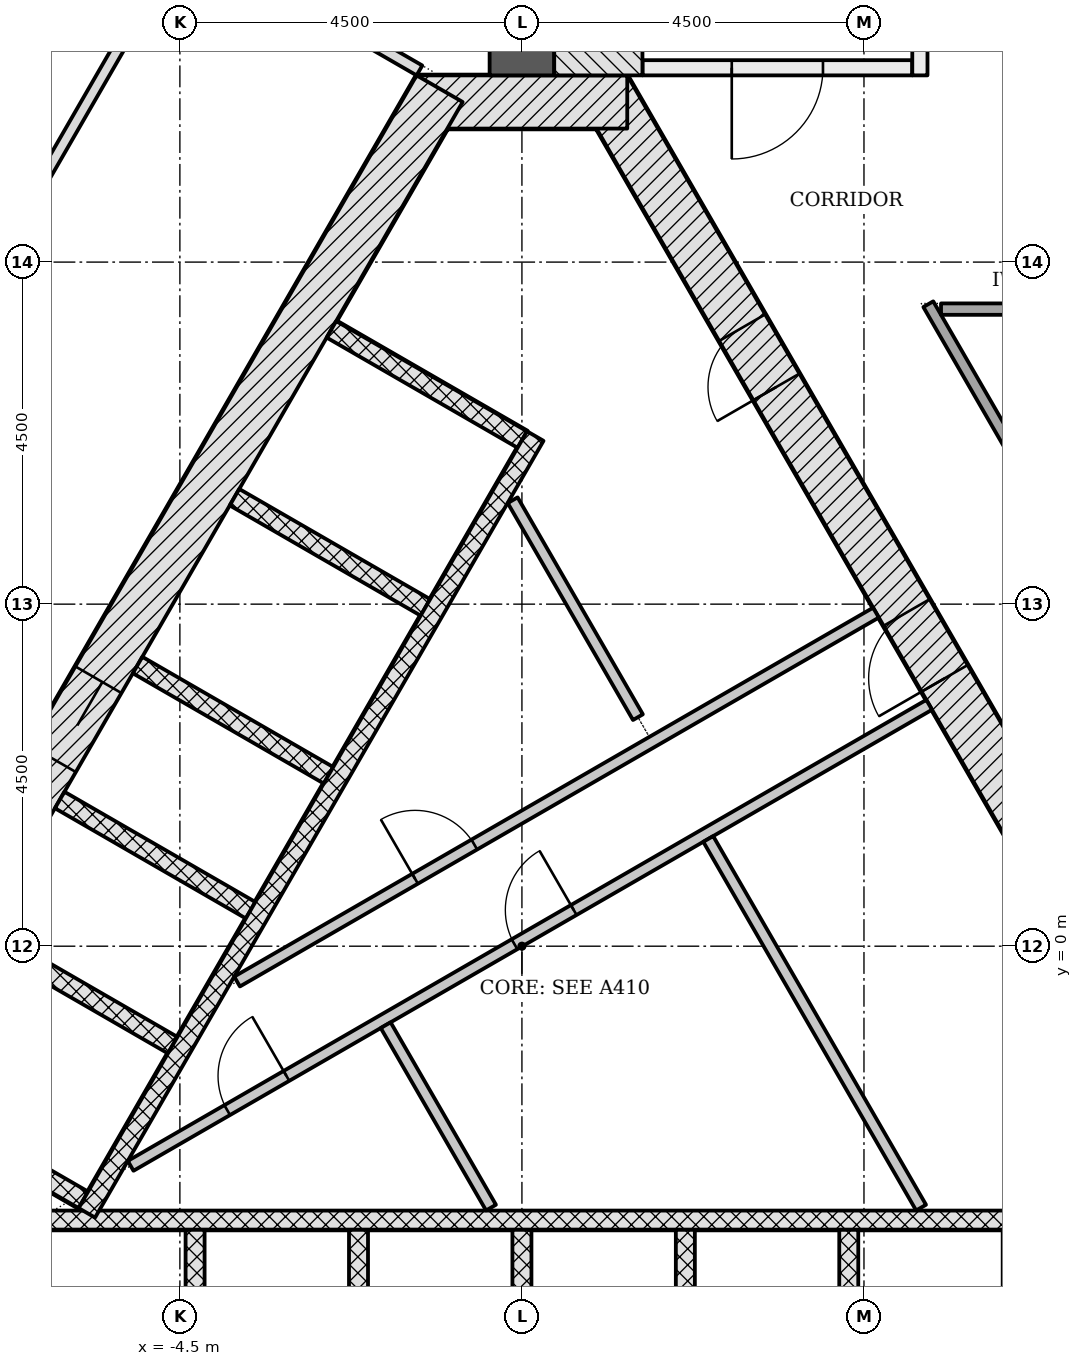
"""IFC4 building model, lengths in metres.
Left out: names, types, materials, properties, quantities, classifications, styles, units other than length and angle.
Written with IfcOpenShell. Run it as: python <this file> out.ifc"""

import sys

from ifc_helpers import new_model, si_unit, direction, frame, frame_2d, origin, place, context, subcontext, project, spatial, rectangle, extrude, element, fill, save


model = new_model("IFC4")
c1 = context("Model", 3, precision=1e-05, world=origin(), true_north=direction((0.0, 1.0)))
c2 = subcontext(c1, "Body", "Model", "MODEL_VIEW")
j1 = project(units=[si_unit("LENGTHUNIT", "METRE"), si_unit("PLANEANGLEUNIT", "RADIAN")], contexts=[c1])
p1 = place(None, origin())
s1 = spatial("IfcSite", under=j1, at=p1, CompositionType="ELEMENT")
p2 = place(p1, origin())
s2 = spatial("IfcBuilding", under=s1, at=p2, CompositionType="ELEMENT")
p3 = place(p2, frame((0.0, 0.0, 72.6)))
s3 = spatial("IfcBuildingStorey", under=s2, at=p3, CompositionType="ELEMENT", Elevation=72.6)
p4 = place(p3, frame((10.311, -4.703, -0.2), z_axis=(0.0, 0.0, 1.0), x_axis=(-0.500001446645, 0.866024568562, 0.0)))
e1 = element("IfcWall", 1, at=p4, inside=s3, PredefinedType="SHEAR", context=c2, shape_type="SweptSolid", body=[
    extrude(rectangle(XDim=18.458, YDim=0.7, at=frame_2d((9.229, 0.0))), origin(), (0.0, 0.0, 1.0), 3.6),
])
p5 = place(p4, frame((9.5, 0.0, 0.2)))
e2 = element("IfcOpeningElement", 2, at=p5, cuts=e1, PredefinedType="OPENING", context=c2, shape_type="SweptSolid", body=[
    extrude(rectangle(XDim=1.0, YDim=2.1, at=frame_2d((0.5, 1.05))), frame((0.0, 0.36, 0.0), z_axis=(0.0, -1.0, 0.0), x_axis=(1.0, 0.0, 0.0)), (0.0, 0.0, 1.0), 0.72),
])
p6 = place(p4, frame((4.402, 0.0, 0.2)))
e3 = element("IfcOpeningElement", 3, at=p6, cuts=e1, PredefinedType="OPENING", context=c2, shape_type="SweptSolid", body=[
    extrude(rectangle(XDim=0.9, YDim=2.1, at=frame_2d((0.45, 1.05))), frame((0.0, 0.36, 0.0), z_axis=(0.0, -1.0, 0.0), x_axis=(1.0, 0.0, 0.0)), (0.0, 0.0, 1.0), 0.72),
])
p7 = place(p4, frame((13.927, 0.0, 0.2)))
e4 = element("IfcOpeningElement", 4, at=p7, cuts=e1, PredefinedType="OPENING", context=c2, shape_type="SweptSolid", body=[
    extrude(rectangle(XDim=0.9, YDim=2.1, at=frame_2d((0.45, 1.05))), frame((0.0, 0.36, 0.0), z_axis=(0.0, -1.0, 0.0), x_axis=(1.0, 0.0, 0.0)), (0.0, 0.0, 1.0), 0.72),
])
p8 = place(p3, frame((1.386, 11.106, -0.2), z_axis=(0.0, 0.0, 1.0), x_axis=(-1.0, 0.0, 0.0)))
e5 = element("IfcWall", 5, at=p8, inside=s3, PredefinedType="SHEAR", context=c2, shape_type="SweptSolid", body=[
    extrude(rectangle(XDim=2.771, YDim=0.7, at=frame_2d((1.386, 0.0))), origin(), (0.0, 0.0, 1.0), 3.6),
])
p9 = place(p3, frame((-1.083, 11.281, -0.2), z_axis=(0.0, 0.0, 1.0), x_axis=(-0.500001446645, -0.866024568562, 0.0)))
e6 = element("IfcWall", 6, at=p9, inside=s3, PredefinedType="SHEAR", context=c2, shape_type="SweptSolid", body=[
    extrude(rectangle(XDim=18.458, YDim=0.7, at=frame_2d((9.229, 0.0))), origin(), (0.0, 0.0, 1.0), 3.6),
])
p10 = place(p9, frame((8.979, 0.0, 0.2)))
e7 = element("IfcOpeningElement", 7, at=p10, cuts=e6, PredefinedType="OPENING", context=c2, shape_type="SweptSolid", body=[
    extrude(rectangle(XDim=1.2, YDim=2.1, at=frame_2d((0.6, 1.05))), frame((0.0, 0.36, 0.0), z_axis=(0.0, -1.0, 0.0), x_axis=(1.0, 0.0, 0.0)), (0.0, 0.0, 1.0), 0.72),
])
p11 = place(p9, frame((11.029, 0.0, 0.2)))
e8 = element("IfcOpeningElement", 8, at=p11, cuts=e6, PredefinedType="OPENING", context=c2, shape_type="SweptSolid", body=[
    extrude(rectangle(XDim=1.2, YDim=2.1, at=frame_2d((0.6, 1.05))), frame((0.0, 0.36, 0.0), z_axis=(0.0, -1.0, 0.0), x_axis=(1.0, 0.0, 0.0)), (0.0, 0.0, 1.0), 0.72),
])
p12 = place(p3, frame((0.0, 11.456, -0.2), z_axis=(0.0, 0.0, 1.0), x_axis=(0.0, 1.0, 0.0)))
e9 = element("IfcWall", 9, at=p12, inside=s3, PredefinedType="SHEAR", context=c2, shape_type="SweptSolid", body=[
    extrude(rectangle(XDim=13.382, YDim=0.85, at=frame_2d((6.691, 0.0))), origin(), (0.0, 0.0, 1.0), 3.6),
])
for number, where, z_axis, x_axis in (
    (10, (-4.3, -6.228, -0.2), (0.0, 0.0, 1.0), (0.0, 1.0, 0.0)),
    (11, (-2.15, -6.228, -0.2), (0.0, 0.0, 1.0), (0.0, 1.0, 0.0)),
    (12, (0.0, -6.228, -0.2), (0.0, 0.0, 1.0), (0.0, 1.0, 0.0)),
    (13, (2.15, -6.228, -0.2), (0.0, 0.0, 1.0), (0.0, 1.0, 0.0)),
    (14, (4.3, -6.228, -0.2), (0.0, 0.0, 1.0), (0.0, 1.0, 0.0)),
):
    element("IfcWall", number, at=place(p3, frame(where, z_axis=z_axis, x_axis=x_axis)), inside=s3, PredefinedType="PARTITIONING", context=c2, shape_type="SweptSolid", body=[
        extrude(rectangle(XDim=2.5, YDim=0.25, at=frame_2d((1.25, 0.0))), origin(), (0.0, 0.0, 1.0), 3.6),
    ])
p13 = place(p3, frame((-6.575, -3.603, 0.0), z_axis=(0.0, 0.0, 1.0), x_axis=(1.0, 0.0, 0.0)))
e15 = element("IfcWall", 15, at=p13, inside=s3, PredefinedType="PARTITIONING", context=c2, shape_type="SweptSolid", body=[
    extrude(rectangle(XDim=13.15, YDim=0.25, at=frame_2d((6.575, 0.0))), origin(), (0.0, 0.0, 1.0), 3.4),
])
p14 = place(p3, frame((-2.506, 8.115, -0.2), z_axis=(0.0, 0.0, 1.0), x_axis=(0.865996321171, -0.50005036918, 0.0)))
e16 = element("IfcWall", 16, at=p14, inside=s3, PredefinedType="PARTITIONING", context=c2, shape_type="SweptSolid", body=[
    extrude(rectangle(XDim=2.9, YDim=0.25, at=frame_2d((1.45, 0.0))), origin(), (0.0, 0.0, 1.0), 3.6),
])
for number, where, z_axis, x_axis in (
    (17, (-3.781, 5.907, -0.2), (0.0, 0.0, 1.0), (0.866, -0.5, 0.0)),
    (18, (-5.056, 3.699, -0.2), (0.0, 0.0, 1.0), (0.866, -0.5, 0.0)),
    (19, (-6.081, 1.923, -0.2), (0.0, 0.0, 1.0), (0.866, -0.5, 0.0)),
    (20, (-7.106, 0.148, -0.2), (0.0, 0.0, 1.0), (0.866, -0.5, 0.0)),
    (21, (-8.281, -1.887, -0.2), (0.0, 0.0, 1.0), (0.866, -0.5, 0.0)),
):
    element("IfcWall", number, at=place(p3, frame(where, z_axis=z_axis, x_axis=x_axis)), inside=s3, PredefinedType="PARTITIONING", context=c2, shape_type="SweptSolid", body=[
        extrude(rectangle(XDim=2.9, YDim=0.25, at=frame_2d((1.45, 0.0))), origin(), (0.0, 0.0, 1.0), 3.6),
    ])
p15 = place(p3, frame((0.176, 6.711, 0.0), z_axis=(0.0, 0.0, 1.0), x_axis=(-0.500004227369, -0.866022963098, 0.0)))
e22 = element("IfcWall", 22, at=p15, inside=s3, PredefinedType="PARTITIONING", context=c2, shape_type="SweptSolid", body=[
    extrude(rectangle(XDim=11.8, YDim=0.25, at=frame_2d((5.9, 0.0))), origin(), (0.0, 0.0, 1.0), 3.4),
])
p16 = place(p3, frame((-5.148, -2.89, 0.0), z_axis=(0.0, 0.0, 1.0), x_axis=(0.866030081544, 0.499991897794, 0.0)))
e23 = element("IfcWall", 23, at=p16, inside=s3, PredefinedType="PARTITIONING", context=c2, shape_type="SweptSolid", body=[
    extrude(rectangle(XDim=12.131, YDim=0.15, at=frame_2d((6.065, 0.0))), origin(), (0.0, 0.0, 1.0), 3.4),
])
p17 = place(p16, frame((5.831, 0.0, 0.0)))
e24 = element("IfcOpeningElement", 24, at=p17, cuts=e23, PredefinedType="OPENING", context=c2, shape_type="SweptSolid", body=[
    extrude(rectangle(XDim=0.9, YDim=2.1, at=frame_2d((0.45, 1.05))), frame((0.0, 0.085, 0.0), z_axis=(0.0, -1.0, 0.0), x_axis=(1.0, 0.0, 0.0)), (0.0, 0.0, 1.0), 0.17),
])
p18 = place(p16, frame((1.467, 0.0, 0.0)))
e25 = element("IfcOpeningElement", 25, at=p18, cuts=e23, PredefinedType="OPENING", context=c2, shape_type="SweptSolid", body=[
    extrude(rectangle(XDim=0.9, YDim=2.1, at=frame_2d((0.45, 1.05))), frame((0.0, 0.085, 0.0), z_axis=(0.0, -1.0, 0.0), x_axis=(1.0, 0.0, 0.0)), (0.0, 0.0, 1.0), 0.17),
])
p19 = place(p3, frame((-3.748, -0.465, 0.0), z_axis=(0.0, 0.0, 1.0), x_axis=(0.866033540873, 0.499985905884, 0.0)))
e26 = element("IfcWall", 26, at=p19, inside=s3, PredefinedType="PARTITIONING", context=c2, shape_type="SweptSolid", body=[
    extrude(rectangle(XDim=9.706, YDim=0.15, at=frame_2d((4.853, 0.0))), origin(), (0.0, 0.0, 1.0), 3.4),
])
p20 = place(p19, frame((2.704, 0.0, 0.0)))
e27 = element("IfcOpeningElement", 27, at=p20, cuts=e26, PredefinedType="OPENING", context=c2, shape_type="SweptSolid", body=[
    extrude(rectangle(XDim=0.9, YDim=2.1, at=frame_2d((0.45, 1.05))), frame((0.0, 0.085, 0.0), z_axis=(0.0, -1.0, 0.0), x_axis=(1.0, 0.0, 0.0)), (0.0, 0.0, 1.0), 0.17),
])
p21 = place(p3, frame((1.526, 3.013, 0.0), z_axis=(0.0, 0.0, 1.0), x_axis=(-0.499978925887, 0.866037570588, 0.0)))
e28 = element("IfcWall", 28, at=p21, inside=s3, PredefinedType="PARTITIONING", context=c2, shape_type="SweptSolid", body=[
    extrude(rectangle(XDim=3.296, YDim=0.15, at=frame_2d((1.648, 0.0))), origin(), (0.0, 0.0, 1.0), 3.4),
])
p22 = place(p3, frame((-0.407, -3.439, 0.0), z_axis=(0.0, 0.0, 1.0), x_axis=(-0.500004591975, 0.86602275259, 0.0)))
e29 = element("IfcWall", 29, at=p22, inside=s3, PredefinedType="PARTITIONING", context=c2, shape_type="SweptSolid", body=[
    extrude(rectangle(XDim=2.771, YDim=0.15, at=frame_2d((1.386, 0.0))), origin(), (0.0, 0.0, 1.0), 3.4),
])
p23 = place(p3, frame((5.251, -3.439, 0.0), z_axis=(0.0, 0.0, 1.0), x_axis=(-0.500011755427, 0.866018616679, 0.0)))
e30 = element("IfcWall", 30, at=p23, inside=s3, PredefinedType="PARTITIONING", context=c2, shape_type="SweptSolid", body=[
    extrude(rectangle(XDim=5.6, YDim=0.15, at=frame_2d((2.8, 0.0))), origin(), (0.0, 0.0, 1.0), 3.4),
])
p24 = place(p3, frame((5.135, 11.556, -0.2), z_axis=(0.0, 0.0, 1.0), x_axis=(-1.0, 0.0, 0.0)))
e31 = element("IfcWall", 31, at=p24, inside=s3, PredefinedType="SHEAR", context=c2, shape_type="SweptSolid", body=[
    extrude(rectangle(XDim=3.55, YDim=0.2, at=frame_2d((1.775, 0.0))), origin(), (0.0, 0.0, 1.0), 3.6),
])
p25 = place(p24, frame((1.175, 0.0, 0.2)))
e32 = element("IfcOpeningElement", 32, at=p25, cuts=e31, PredefinedType="OPENING", context=c2, shape_type="SweptSolid", body=[
    extrude(rectangle(XDim=1.2, YDim=2.1, at=frame_2d((0.6, 1.05))), frame((0.0, 0.11, 0.0), z_axis=(0.0, -1.0, 0.0), x_axis=(1.0, 0.0, 0.0)), (0.0, 0.0, 1.0), 0.22),
])
p26 = place(p3, frame((5.236, 11.456, -0.2), z_axis=(0.0, 0.0, 1.0), x_axis=(0.0, 1.0, 0.0)))
e33 = element("IfcWall", 33, at=p26, inside=s3, PredefinedType="SHEAR", context=c2, shape_type="SweptSolid", body=[
    extrude(rectangle(XDim=5.6, YDim=0.2, at=frame_2d((2.8, 0.0))), origin(), (0.0, 0.0, 1.0), 3.6),
])
p27 = place(p26, frame((0.45, 0.0, 0.2)))
e34 = element("IfcOpeningElement", 34, at=p27, cuts=e33, PredefinedType="OPENING", context=c2, shape_type="SweptSolid", body=[
    extrude(rectangle(XDim=1.2, YDim=2.1, at=frame_2d((0.6, 1.05))), frame((0.0, 0.11, 0.0), z_axis=(0.0, -1.0, 0.0), x_axis=(1.0, 0.0, 0.0)), (0.0, 0.0, 1.0), 0.22),
])
p28 = place(p3, frame((1.005, 11.456, -0.2), z_axis=(0.0, 0.0, 1.0), x_axis=(0.0, 1.0, 0.0)))
e35 = element("IfcWall", 35, at=p28, inside=s3, PredefinedType="SHEAR", context=c2, shape_type="SweptSolid", body=[
    extrude(rectangle(XDim=7.2, YDim=1.161, at=frame_2d((3.6, 0.0))), origin(), (0.0, 0.0, 1.0), 3.6),
])
p29 = place(p3, frame((-16.256, -3.149, 0.0), z_axis=(0.0, 0.0, 1.0), x_axis=(0.499999683919, 0.866025586274, 0.0)))
e36 = element("IfcWall", 36, at=p29, inside=s3, PredefinedType="PARTITIONING", context=c2, shape_type="SweptSolid", body=[
    extrude(rectangle(XDim=22.234, YDim=0.15, at=frame_2d((11.117, 0.0))), origin(), (0.0, 0.0, 1.0), 2.778),
])
p30 = place(p29, frame((13.551, 0.0, 0.0)))
e37 = element("IfcOpeningElement", 37, at=p30, cuts=e36, PredefinedType="OPENING", context=c2, shape_type="SweptSolid", body=[
    extrude(rectangle(XDim=1.0, YDim=2.1, at=frame_2d((0.5, 1.05))), frame((0.0, 0.085, 0.0), z_axis=(0.0, -1.0, 0.0), x_axis=(1.0, 0.0, 0.0)), (0.0, 0.0, 1.0), 0.17),
])
p31 = place(p29, frame((5.647, 0.0, 0.0)))
e38 = element("IfcOpeningElement", 38, at=p31, cuts=e36, PredefinedType="OPENING", context=c2, shape_type="SweptSolid", body=[
    extrude(rectangle(XDim=1.5, YDim=2.1, at=frame_2d((0.75, 1.05))), frame((0.0, 0.085, 0.0), z_axis=(0.0, -1.0, 0.0), x_axis=(1.0, 0.0, 0.0)), (0.0, 0.0, 1.0), 0.17),
])
p32 = place(p3, frame((-4.407, 13.374, 0.0), z_axis=(0.0, 0.0, 1.0), x_axis=(-0.499997181693, -0.866027030928, 0.0)))
e39 = element("IfcWall", 39, at=p32, inside=s3, PredefinedType="PARTITIONING", context=c2, shape_type="SweptSolid", body=[
    extrude(rectangle(XDim=16.77, YDim=0.15, at=frame_2d((8.385, 0.0))), origin(), (0.0, 0.0, 1.0), 2.778),
])
p33 = place(p32, frame((8.879, 0.0, 0.0)))
e40 = element("IfcOpeningElement", 40, at=p33, cuts=e39, PredefinedType="OPENING", context=c2, shape_type="SweptSolid", body=[
    extrude(rectangle(XDim=1.0, YDim=2.1, at=frame_2d((0.5, 1.05))), frame((0.0, 0.085, 0.0), z_axis=(0.0, -1.0, 0.0), x_axis=(1.0, 0.0, 0.0)), (0.0, 0.0, 1.0), 0.17),
])
p34 = place(p3, frame((5.346, 8.446, 0.0), z_axis=(0.0, 0.0, 1.0), x_axis=(0.500008781656, -0.866020333634, 0.0)))
e41 = element("IfcWall", 41, at=p34, inside=s3, PredefinedType="PARTITIONING", context=c2, shape_type="SweptSolid", body=[
    extrude(rectangle(XDim=15.057, YDim=0.15, at=frame_2d((7.528, 0.0))), origin(), (0.0, 0.0, 1.0), 2.778),
])
p35 = place(p34, frame((12.55, 0.0, 0.0)))
e42 = element("IfcOpeningElement", 42, at=p35, cuts=e41, PredefinedType="OPENING", context=c2, shape_type="SweptSolid", body=[
    extrude(rectangle(XDim=1.0, YDim=2.1, at=frame_2d((0.5, 1.05))), frame((0.0, 0.085, 0.0), z_axis=(0.0, -1.0, 0.0), x_axis=(1.0, 0.0, 0.0)), (0.0, 0.0, 1.0), 0.17),
])
p36 = place(p34, frame((6.753, 0.0, 0.0)))
e43 = element("IfcOpeningElement", 43, at=p36, cuts=e41, PredefinedType="OPENING", context=c2, shape_type="SweptSolid", body=[
    extrude(rectangle(XDim=1.0, YDim=2.1, at=frame_2d((0.5, 1.05))), frame((0.0, 0.085, 0.0), z_axis=(0.0, -1.0, 0.0), x_axis=(1.0, 0.0, 0.0)), (0.0, 0.0, 1.0), 0.17),
])
p37 = place(p3, frame((-4.379, 13.271, 0.0), z_axis=(0.0, 0.0, 1.0), x_axis=(0.866019471182, -0.500010275428, 0.0)))
e44 = element("IfcWall", 44, at=p37, inside=s3, PredefinedType="PARTITIONING", context=c2, shape_type="SweptSolid", body=[
    extrude(rectangle(XDim=3.5, YDim=0.15, at=frame_2d((1.75, 0.0))), origin(), (0.0, 0.0, 1.0), 3.4),
])
p38 = place(p3, frame((5.514, 8.381, 0.0), z_axis=(0.0, 0.0, 1.0), x_axis=(1.0, 0.0, 0.0)))
e45 = element("IfcWall", 45, at=p38, inside=s3, PredefinedType="PARTITIONING", context=c2, shape_type="SweptSolid", body=[
    extrude(rectangle(XDim=1.872, YDim=0.15, at=frame_2d((0.936, 0.0))), origin(), (0.0, 0.0, 1.0), 3.4),
])
p39 = place(p10, origin())
e46 = element("IfcDoor", 46, at=p39, inside=s3, OperationType="DOUBLE_DOOR_SLIDING", PredefinedType="DOOR", context=c2, shape_type="SweptSolid", body=[
    extrude(rectangle(XDim=1.2, YDim=2.1, at=frame_2d((0.6, 1.05))), frame((0.0, 0.025, 0.0), z_axis=(0.0, -1.0, 0.0), x_axis=(1.0, 0.0, 0.0)), (0.0, 0.0, 1.0), 0.05),
])
fill(e7, e46)
p40 = place(p5, origin())
e47 = element("IfcDoor", 47, at=p40, inside=s3, OperationType="SINGLE_SWING_LEFT", PredefinedType="DOOR", context=c2, shape_type="SweptSolid", body=[
    extrude(rectangle(XDim=1.0, YDim=2.1, at=frame_2d((0.5, 1.05))), frame((0.0, 0.075, 0.0), z_axis=(0.0, -1.0, 0.0), x_axis=(1.0, 0.0, 0.0)), (0.0, 0.0, 1.0), 0.15),
])
fill(e2, e47)
p41 = place(p7, origin())
e48 = element("IfcDoor", 48, at=p41, inside=s3, OperationType="SINGLE_SWING_LEFT", PredefinedType="DOOR", context=c2, shape_type="SweptSolid", body=[
    extrude(rectangle(XDim=0.9, YDim=2.1, at=frame_2d((0.45, 1.05))), frame((0.0, 0.075, 0.0), z_axis=(0.0, -1.0, 0.0), x_axis=(1.0, 0.0, 0.0)), (0.0, 0.0, 1.0), 0.15),
])
fill(e4, e48)
p42 = place(p17, origin())
e49 = element("IfcDoor", 49, at=p42, inside=s3, OperationType="SINGLE_SWING_RIGHT", PredefinedType="DOOR", context=c2, shape_type="SweptSolid", body=[
    extrude(rectangle(XDim=0.9, YDim=2.1, at=frame_2d((0.45, 1.05))), frame((0.0, 0.025, 0.0), z_axis=(0.0, -1.0, 0.0), x_axis=(1.0, 0.0, 0.0)), (0.0, 0.0, 1.0), 0.05),
])
fill(e24, e49)
p43 = place(p20, origin())
e50 = element("IfcDoor", 50, at=p43, inside=s3, OperationType="SINGLE_SWING_LEFT", PredefinedType="DOOR", context=c2, shape_type="SweptSolid", body=[
    extrude(rectangle(XDim=0.9, YDim=2.1, at=frame_2d((0.45, 1.05))), frame((0.0, 0.025, 0.0), z_axis=(0.0, -1.0, 0.0), x_axis=(1.0, 0.0, 0.0)), (0.0, 0.0, 1.0), 0.05),
])
fill(e27, e50)
p44 = place(p18, origin())
e51 = element("IfcDoor", 51, at=p44, inside=s3, OperationType="SINGLE_SWING_RIGHT", PredefinedType="DOOR", context=c2, shape_type="SweptSolid", body=[
    extrude(rectangle(XDim=0.9, YDim=2.1, at=frame_2d((0.45, 1.05))), frame((0.0, 0.025, 0.0), z_axis=(0.0, -1.0, 0.0), x_axis=(1.0, 0.0, 0.0)), (0.0, 0.0, 1.0), 0.05),
])
fill(e25, e51)
p45 = place(p25, origin())
e52 = element("IfcDoor", 52, at=p45, inside=s3, OperationType="SINGLE_SWING_RIGHT", PredefinedType="DOOR", context=c2, shape_type="SweptSolid", body=[
    extrude(rectangle(XDim=1.2, YDim=2.1, at=frame_2d((0.6, 1.05))), frame((0.0, 0.025, 0.0), z_axis=(0.0, -1.0, 0.0), x_axis=(1.0, 0.0, 0.0)), (0.0, 0.0, 1.0), 0.05),
])
fill(e32, e52)
save(model, sys.argv[1])
